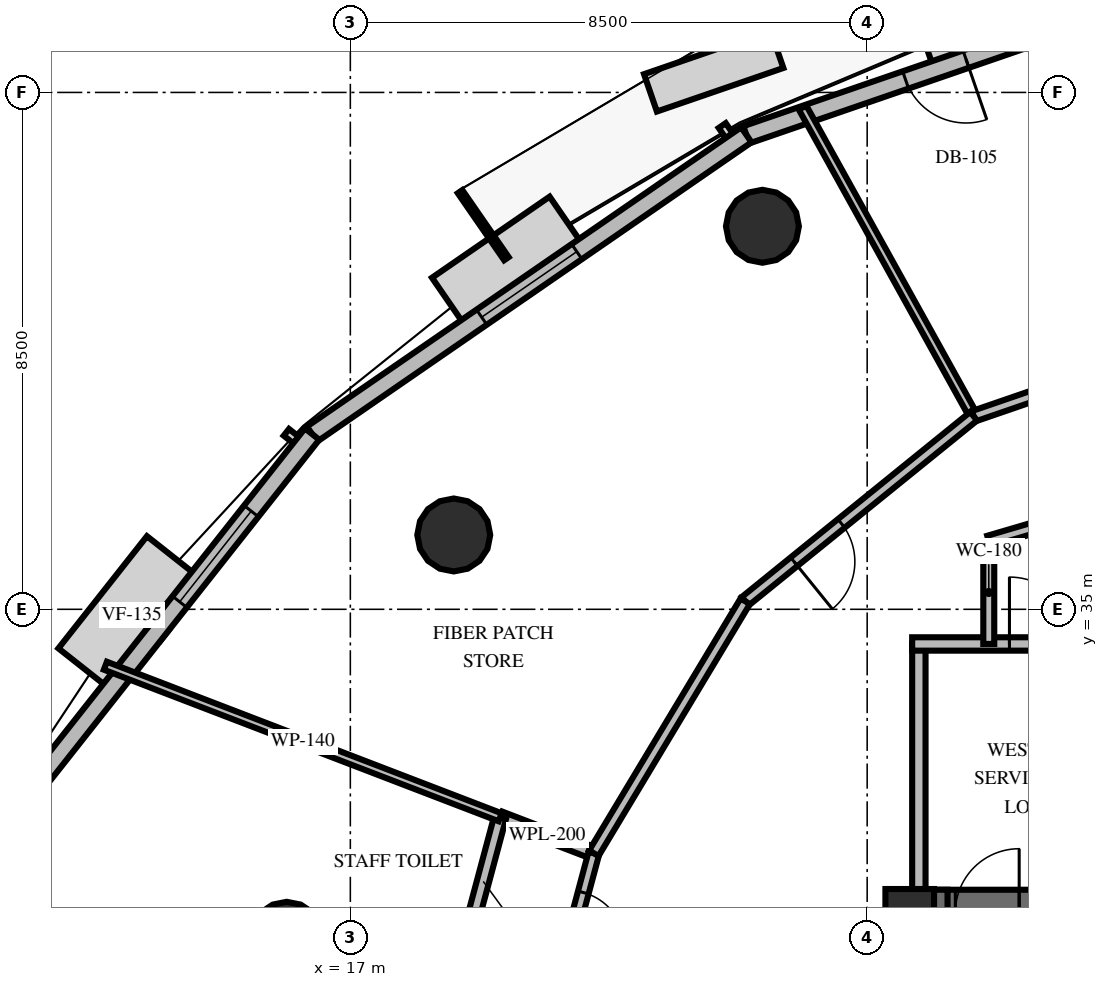
"""IFC4 building model, lengths in metres.
Left out: names, types, materials, properties, quantities, classifications, styles, units other than length and angle.
Written with IfcOpenShell. Run it as: python <this file> out.ifc"""

import sys

from ifc_helpers import new_model, si_unit, direction, frame, frame_2d, origin, origin_2d, place, context, subcontext, project, spatial, rectangle, circle, extrude, element, fill, save


model = new_model("IFC4")
c1 = context("Model", 3, precision=1e-05, world=origin(), true_north=direction((0.0, 1.0)))
c2 = subcontext(c1, "Body", "Model", "MODEL_VIEW")
j1 = project(units=[si_unit("LENGTHUNIT", "METRE"), si_unit("PLANEANGLEUNIT", "RADIAN")], contexts=[c1])
p1 = place(None, origin())
s1 = spatial("IfcSite", under=j1, at=p1, CompositionType="ELEMENT")
p2 = place(p1, origin())
s2 = spatial("IfcBuilding", under=s1, at=p2, CompositionType="ELEMENT")
p3 = place(p2, frame((0.0, 0.0, 113.8)))
s3 = spatial("IfcBuildingStorey", under=s2, at=p3, CompositionType="ELEMENT", Elevation=113.8)
p4 = place(p3, frame((26.072, 30.013, 0.0), z_axis=(0.0, 0.0, 1.0), x_axis=(1.0, 0.0, 0.0)))
e1 = element("IfcWall", 1, at=p4, inside=s3, PredefinedType="SHEAR", context=c2, shape_type="SweptSolid", body=[
    extrude(rectangle(XDim=15.866, YDim=0.75, at=frame_2d((7.933, 0.0))), origin(), (0.0, 0.0, 1.0), 4.0),
])
p5 = place(p4, frame((0.878, 0.0, 0.0)))
e2 = element("IfcOpeningElement", 2, at=p5, cuts=e1, PredefinedType="OPENING", context=c2, shape_type="SweptSolid", body=[
    extrude(rectangle(XDim=1.05, YDim=2.15, at=frame_2d((0.525, 1.075))), frame((0.0, 0.385, 0.0), z_axis=(0.0, -1.0, 0.0), x_axis=(1.0, 0.0, 0.0)), (0.0, 0.0, 1.0), 0.77),
])
p6 = place(p4, frame((13.928, 0.0, 0.0)))
e3 = element("IfcOpeningElement", 3, at=p6, cuts=e1, PredefinedType="OPENING", context=c2, shape_type="SweptSolid", body=[
    extrude(rectangle(XDim=1.05, YDim=2.15, at=frame_2d((0.525, 1.075))), frame((0.0, 0.385, 0.0), z_axis=(0.0, -1.0, 0.0), x_axis=(1.0, 0.0, 0.0)), (0.0, 0.0, 1.0), 0.77),
])
p7 = place(p4, frame((7.378, 0.0, 0.0)))
e4 = element("IfcOpeningElement", 4, at=p7, cuts=e1, PredefinedType="OPENING", context=c2, shape_type="SweptSolid", body=[
    extrude(rectangle(XDim=1.1, YDim=2.15, at=frame_2d((0.55, 1.075))), frame((0.0, 0.385, 0.0), z_axis=(0.0, -1.0, 0.0), x_axis=(1.0, 0.0, 0.0)), (0.0, 0.0, 1.0), 0.77),
])
p8 = place(p3, frame((26.447, 19.812, 0.0), z_axis=(0.0, 0.0, 1.0), x_axis=(0.0, 1.0, 0.0)))
e5 = element("IfcWall", 5, at=p8, inside=s3, PredefinedType="SHEAR", context=c2, shape_type="SweptSolid", body=[
    extrude(rectangle(XDim=10.576, YDim=0.75, at=frame_2d((5.288, 0.0))), origin(), (0.0, 0.0, 1.0), 4.0),
])
p9 = place(p3, frame((26.2, 30.0, 0.0), z_axis=(0.0, 0.0, 1.0), x_axis=(1.0, 0.0, 0.0)))
e6 = element("IfcColumn", 6, at=p9, inside=s3, PredefinedType="PILASTER", context=c2, shape_type="SweptSolid", body=[
    extrude(rectangle(XDim=0.8, YDim=0.8, at=origin_2d()), origin(), (0.0, 0.0, 1.0), 4.0),
])
for number, where, z_axis, x_axis in (
    (7, (23.778, 41.299, 0.0), (0.0, 0.0, 1.0), (1.0, 0.0, 0.0)),
    (8, (18.701, 36.222, 0.0), (0.0, 0.0, 1.0), (1.0, 0.0, 0.0)),
    (9, (15.954, 29.59, 0.0), (0.0, 0.0, 1.0), (1.0, 0.0, 0.0)),
):
    element("IfcColumn", number, at=place(p3, frame(where, z_axis=z_axis, x_axis=x_axis)), inside=s3, PredefinedType="COLUMN", context=c2, shape_type="SweptSolid", body=[
        extrude(circle(Radius=0.6, at=origin_2d()), origin(), (0.0, 0.0, 1.0), 4.0),
    ])
p10 = place(p3, frame((31.919, 45.698, 0.0), z_axis=(0.0, 0.0, 1.0), x_axis=(-0.945509178588, -0.325595444079, 0.0)))
e10 = element("IfcWall", 10, at=p10, inside=s3, PredefinedType="SOLIDWALL", context=c2, shape_type="SweptSolid", body=[
    extrude(rectangle(XDim=8.891, YDim=0.3, at=frame_2d((4.445, 0.0))), origin(), (0.0, 0.0, 1.0), 2.9),
])
p11 = place(p10, frame((5.07, 0.0, 0.0)))
e11 = element("IfcOpeningElement", 11, at=p11, cuts=e10, PredefinedType="OPENING", context=c2, shape_type="SweptSolid", body=[
    extrude(rectangle(XDim=1.05, YDim=2.15, at=frame_2d((0.525, 1.075))), frame((0.0, 0.16, 0.0), z_axis=(0.0, -1.0, 0.0), x_axis=(1.0, 0.0, 0.0)), (0.0, 0.0, 1.0), 0.32),
])
p12 = place(p3, frame((23.513, 42.803, 0.0), z_axis=(0.0, 0.0, 1.0), x_axis=(-0.823433656397, -0.567412560235, 0.0)))
e12 = element("IfcWall", 12, at=p12, inside=s3, PredefinedType="SOLIDWALL", context=c2, shape_type="SweptSolid", body=[
    extrude(rectangle(XDim=8.673, YDim=0.3, at=frame_2d((4.336, 0.0))), origin(), (0.0, 0.0, 1.0), 2.9),
])
p13 = place(p12, frame((3.386, 0.0, 0.8)))
e13 = element("IfcOpeningElement", 13, at=p13, cuts=e12, PredefinedType="OPENING", context=c2, shape_type="SweptSolid", body=[
    extrude(rectangle(XDim=1.9, YDim=1.95, at=frame_2d((0.95, 0.975))), frame((0.0, 0.16, 0.0), z_axis=(0.0, -1.0, 0.0), x_axis=(1.0, 0.0, 0.0)), (0.0, 0.0, 1.0), 0.32),
])
p14 = place(p3, frame((16.371, 37.882, 0.0), z_axis=(0.0, 0.0, 1.0), x_axis=(-0.619524983764, -0.784976938828, 0.0)))
e14 = element("IfcWall", 14, at=p14, inside=s3, PredefinedType="SOLIDWALL", context=c2, shape_type="SweptSolid", body=[
    extrude(rectangle(XDim=8.095, YDim=0.3, at=frame_2d((4.048, 0.0))), origin(), (0.0, 0.0, 1.0), 2.9),
])
p15 = place(p14, frame((1.615, 0.0, 0.8)))
e15 = element("IfcOpeningElement", 15, at=p15, cuts=e14, PredefinedType="OPENING", context=c2, shape_type="SweptSolid", body=[
    extrude(rectangle(XDim=1.9, YDim=1.95, at=frame_2d((0.95, 0.975))), frame((0.0, 0.16, 0.0), z_axis=(0.0, -1.0, 0.0), x_axis=(1.0, 0.0, 0.0)), (0.0, 0.0, 1.0), 0.32),
])
p16 = place(p3, frame((26.35, 30.05, 0.0), z_axis=(0.0, 0.0, 1.0), x_axis=(0.0, 1.0, 0.0)))
e16 = element("IfcWall", 16, at=p16, inside=s3, PredefinedType="SOLIDWALL", context=c2, shape_type="SweptSolid", body=[
    extrude(rectangle(XDim=4.38, YDim=0.22, at=frame_2d((2.19, 0.0))), origin(), (0.0, 0.0, 1.0), 2.8),
])
p17 = place(p3, frame((26.24, 34.43, 0.0), z_axis=(0.0, 0.0, 1.0), x_axis=(1.0, 0.0, 0.0)))
e17 = element("IfcWall", 17, at=p17, inside=s3, PredefinedType="SOLIDWALL", context=c2, shape_type="SweptSolid", body=[
    extrude(rectangle(XDim=4.31, YDim=0.22, at=frame_2d((2.155, 0.0))), origin(), (0.0, 0.0, 1.0), 2.8),
])
p18 = place(p17, frame((1.6, 0.0, 0.0)))
e18 = element("IfcOpeningElement", 18, at=p18, cuts=e17, PredefinedType="OPENING", context=c2, shape_type="SweptSolid", body=[
    extrude(rectangle(XDim=1.1, YDim=2.15, at=frame_2d((0.55, 1.075))), frame((0.0, 0.12, 0.0), z_axis=(0.0, -1.0, 0.0), x_axis=(1.0, 0.0, 0.0)), (0.0, 0.0, 1.0), 0.24),
])
p19 = place(p3, frame((27.5, 34.43, 0.0), z_axis=(0.0, 0.0, 1.0), x_axis=(0.0, 1.0, 0.0)))
e19 = element("IfcWall", 19, at=p19, inside=s3, PredefinedType="PARTITIONING", context=c2, shape_type="SweptSolid", body=[
    extrude(rectangle(XDim=1.693, YDim=0.18, at=frame_2d((0.846, 0.0))), origin(), (0.0, 0.0, 1.0), 2.8),
])
p20 = place(p3, frame((27.5, 36.123, 0.0), z_axis=(0.0, 0.0, 1.0), x_axis=(0.959546654541, 0.281549671923, 0.0)))
e20 = element("IfcWall", 20, at=p20, inside=s3, PredefinedType="PARTITIONING", context=c2, shape_type="SweptSolid", body=[
    extrude(rectangle(XDim=6.774, YDim=0.18, at=frame_2d((3.387, 0.0))), origin(), (0.0, 0.0, 1.0), 2.8),
])
p21 = place(p20, frame((2.837, 0.0, 0.0)))
e21 = element("IfcOpeningElement", 21, at=p21, cuts=e20, PredefinedType="OPENING", context=c2, shape_type="SweptSolid", body=[
    extrude(rectangle(XDim=1.1, YDim=2.15, at=frame_2d((0.55, 1.075))), frame((0.0, 0.1, 0.0), z_axis=(0.0, -1.0, 0.0), x_axis=(1.0, 0.0, 0.0)), (0.0, 0.0, 1.0), 0.2),
])
p22 = place(p3, frame((21.005, 30.989, 0.0), z_axis=(0.0, 0.0, 1.0), x_axis=(-0.933589438272, 0.358344472186, 0.0)))
e22 = element("IfcWall", 22, at=p22, inside=s3, PredefinedType="PLUMBINGWALL", context=c2, shape_type="SweptSolid", body=[
    extrude(rectangle(XDim=1.65, YDim=0.2, at=frame_2d((0.825, 0.0))), origin(), (0.0, 0.0, 1.0), 2.8),
])
p23 = place(p3, frame((19.464, 31.58, 0.0), z_axis=(0.0, 0.0, 1.0), x_axis=(-0.258843559344, -0.965919257384, 0.0)))
e23 = element("IfcWall", 23, at=p23, inside=s3, PredefinedType="PLUMBINGWALL", context=c2, shape_type="SweptSolid", body=[
    extrude(rectangle(XDim=3.255, YDim=0.2, at=frame_2d((1.627, 0.0))), origin(), (0.0, 0.0, 1.0), 2.8),
])
p24 = place(p3, frame((21.005, 30.989, 0.0), z_axis=(0.0, 0.0, 1.0), x_axis=(-0.258805973518, -0.965929328715, 0.0)))
e24 = element("IfcWall", 24, at=p24, inside=s3, PredefinedType="PARTITIONING", context=c2, shape_type="SweptSolid", body=[
    extrude(rectangle(XDim=2.91, YDim=0.18, at=frame_2d((1.455, 0.0))), origin(), (0.0, 0.0, 1.0), 2.8),
])
p25 = place(p24, frame((0.669, 0.0, 0.0)))
e25 = element("IfcOpeningElement", 25, at=p25, cuts=e24, PredefinedType="OPENING", context=c2, shape_type="SweptSolid", body=[
    extrude(rectangle(XDim=0.92, YDim=2.1, at=frame_2d((0.46, 1.05))), frame((0.0, 0.1, 0.0), z_axis=(0.0, -1.0, 0.0), x_axis=(1.0, 0.0, 0.0)), (0.0, 0.0, 1.0), 0.2),
])
p26 = place(p3, frame((19.464, 31.58, 0.0), z_axis=(0.0, 0.0, 1.0), x_axis=(-0.933578829384, 0.35837211014, 0.0)))
e26 = element("IfcWall", 26, at=p26, inside=s3, PredefinedType="PARTITIONING", context=c2, shape_type="SweptSolid", body=[
    extrude(rectangle(XDim=6.955, YDim=0.14, at=frame_2d((3.478, 0.0))), origin(), (0.0, 0.0, 1.0), 2.8),
])
p27 = place(p3, frame((27.251, 38.175, 0.0), z_axis=(0.0, 0.0, 1.0), x_axis=(-0.484806879047, 0.874621226605, 0.0)))
e27 = element("IfcWall", 27, at=p27, inside=s3, PredefinedType="PARTITIONING", context=c2, shape_type="SweptSolid", body=[
    extrude(rectangle(XDim=5.803, YDim=0.14, at=frame_2d((2.902, 0.0))), origin(), (0.0, 0.0, 1.0), 2.8),
])
p28 = place(p3, frame((31.823, 39.749, 0.0), z_axis=(0.0, 0.0, 1.0), x_axis=(-0.945531725064, -0.325529963134, 0.0)))
e28 = element("IfcWall", 28, at=p28, inside=s3, PredefinedType="PARTITIONING", context=c2, shape_type="SweptSolid", body=[
    extrude(rectangle(XDim=4.834, YDim=0.18, at=frame_2d((2.417, 0.0))), origin(), (0.0, 0.0, 1.0), 2.8),
])
p29 = place(p28, frame((2.801, 0.0, 0.0)))
e29 = element("IfcOpeningElement", 29, at=p29, cuts=e28, PredefinedType="OPENING", context=c2, shape_type="SweptSolid", body=[
    extrude(rectangle(XDim=1.0, YDim=2.15, at=frame_2d((0.5, 1.075))), frame((0.0, 0.1, 0.0), z_axis=(0.0, -1.0, 0.0), x_axis=(1.0, 0.0, 0.0)), (0.0, 0.0, 1.0), 0.2),
])
p30 = place(p3, frame((27.251, 38.175, 0.0), z_axis=(0.0, 0.0, 1.0), x_axis=(-0.777140194095, -0.629327513082, 0.0)))
e30 = element("IfcWall", 30, at=p30, inside=s3, PredefinedType="PARTITIONING", context=c2, shape_type="SweptSolid", body=[
    extrude(rectangle(XDim=4.834, YDim=0.18, at=frame_2d((2.417, 0.0))), origin(), (0.0, 0.0, 1.0), 2.8),
])
p31 = place(p30, frame((2.801, 0.0, 0.0)))
e31 = element("IfcOpeningElement", 31, at=p31, cuts=e30, PredefinedType="OPENING", context=c2, shape_type="SweptSolid", body=[
    extrude(rectangle(XDim=1.0, YDim=2.15, at=frame_2d((0.5, 1.075))), frame((0.0, 0.1, 0.0), z_axis=(0.0, -1.0, 0.0), x_axis=(1.0, 0.0, 0.0)), (0.0, 0.0, 1.0), 0.2),
])
p32 = place(p3, frame((23.494, 35.132, 0.0), z_axis=(0.0, 0.0, 1.0), x_axis=(-0.515022962095, -0.857176381216, 0.0)))
e32 = element("IfcWall", 32, at=p32, inside=s3, PredefinedType="PARTITIONING", context=c2, shape_type="SweptSolid", body=[
    extrude(rectangle(XDim=4.834, YDim=0.18, at=frame_2d((2.417, 0.0))), origin(), (0.0, 0.0, 1.0), 2.8),
])
p33 = place(p11, origin())
e33 = element("IfcDoor", 33, at=p33, inside=s3, OperationType="SINGLE_SWING_LEFT", PredefinedType="DOOR", context=c2, shape_type="SweptSolid", body=[
    extrude(rectangle(XDim=1.05, YDim=2.15, at=frame_2d((0.525, 1.075))), frame((0.0, 0.025, 0.0), z_axis=(0.0, -1.0, 0.0), x_axis=(1.0, 0.0, 0.0)), (0.0, 0.0, 1.0), 0.05),
])
fill(e11, e33)
p34 = place(p13, origin())
e34 = element("IfcWindow", 34, at=p34, inside=s3, PartitioningType="SINGLE_PANEL", PredefinedType="WINDOW", context=c2, shape_type="SweptSolid", body=[
    extrude(rectangle(XDim=1.9, YDim=1.95, at=frame_2d((0.95, 0.975))), frame((0.0, 0.03, 0.0), z_axis=(0.0, -1.0, 0.0), x_axis=(1.0, 0.0, 0.0)), (0.0, 0.0, 1.0), 0.06),
])
fill(e13, e34)
p35 = place(p15, origin())
e35 = element("IfcWindow", 35, at=p35, inside=s3, PartitioningType="SINGLE_PANEL", PredefinedType="WINDOW", context=c2, shape_type="SweptSolid", body=[
    extrude(rectangle(XDim=1.9, YDim=1.95, at=frame_2d((0.95, 0.975))), frame((0.0, 0.03, 0.0), z_axis=(0.0, -1.0, 0.0), x_axis=(1.0, 0.0, 0.0)), (0.0, 0.0, 1.0), 0.06),
])
fill(e15, e35)
p36 = place(p18, origin())
e36 = element("IfcDoor", 36, at=p36, inside=s3, OperationType="SINGLE_SWING_LEFT", PredefinedType="DOOR", context=c2, shape_type="SweptSolid", body=[
    extrude(rectangle(XDim=1.1, YDim=2.15, at=frame_2d((0.55, 1.075))), frame((0.0, 0.025, 0.0), z_axis=(0.0, -1.0, 0.0), x_axis=(1.0, 0.0, 0.0)), (0.0, 0.0, 1.0), 0.05),
])
fill(e18, e36)
p37 = place(p25, origin())
e37 = element("IfcDoor", 37, at=p37, inside=s3, OperationType="SINGLE_SWING_RIGHT", PredefinedType="DOOR", context=c2, shape_type="SweptSolid", body=[
    extrude(rectangle(XDim=0.92, YDim=2.1, at=frame_2d((0.46, 1.05))), frame((0.0, 0.025, 0.0), z_axis=(0.0, -1.0, 0.0), x_axis=(1.0, 0.0, 0.0)), (0.0, 0.0, 1.0), 0.05),
])
fill(e25, e37)
p38 = place(p31, origin())
e38 = element("IfcDoor", 38, at=p38, inside=s3, OperationType="SINGLE_SWING_RIGHT", PredefinedType="DOOR", context=c2, shape_type="SweptSolid", body=[
    extrude(rectangle(XDim=1.0, YDim=2.15, at=frame_2d((0.5, 1.075))), frame((0.0, 0.025, 0.0), z_axis=(0.0, -1.0, 0.0), x_axis=(1.0, 0.0, 0.0)), (0.0, 0.0, 1.0), 0.05),
])
fill(e31, e38)
save(model, sys.argv[1])
